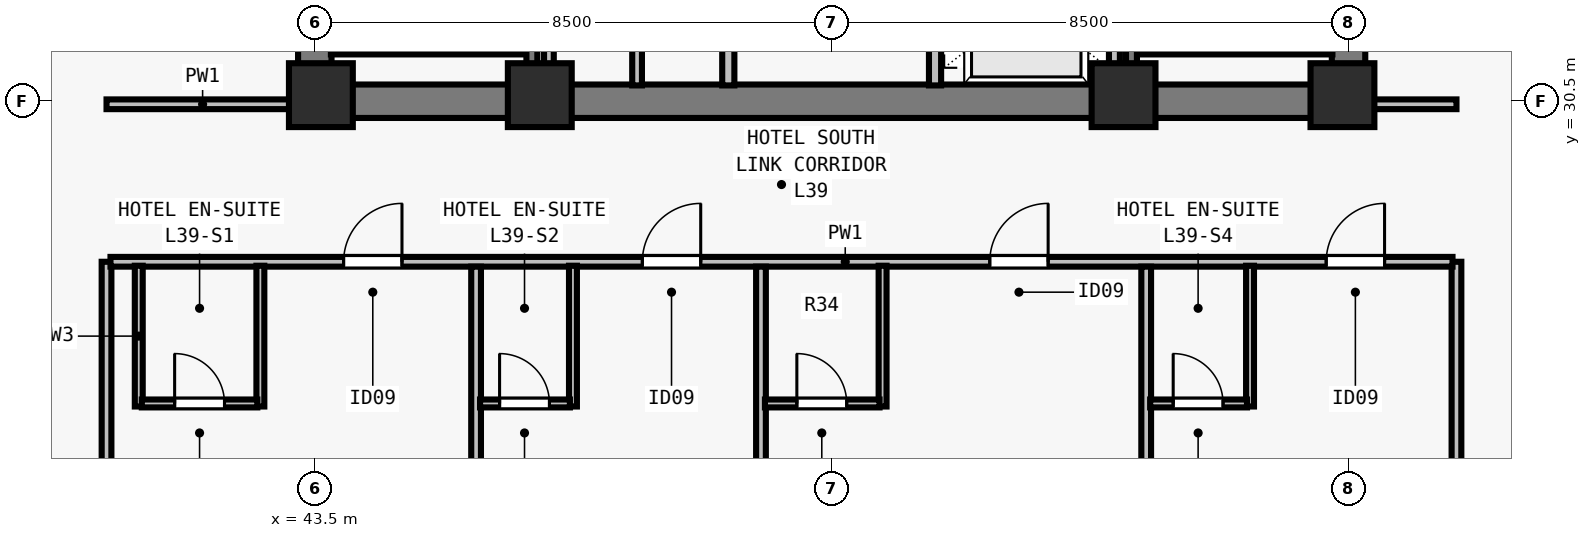
"""IFC4 building model, lengths in metres.
Left out: names, types, materials, properties, quantities, classifications, styles, units other than length and angle.
Written with IfcOpenShell. Run it as: python <this file> out.ifc"""

import sys

from ifc_helpers import new_model, si_unit, direction, frame, frame_2d, origin, origin_2d, place, context, subcontext, project, spatial, rectangle, extrude, element, fill, save


model = new_model("IFC4")
c1 = context("Model", 3, precision=1e-05, world=origin(), true_north=direction((0.0, 1.0)))
c2 = subcontext(c1, "Body", "Model", "MODEL_VIEW")
j1 = project(units=[si_unit("LENGTHUNIT", "METRE"), si_unit("PLANEANGLEUNIT", "RADIAN")], contexts=[c1])
p1 = place(None, origin())
s1 = spatial("IfcSite", under=j1, at=p1, CompositionType="ELEMENT")
p2 = place(p1, origin())
s2 = spatial("IfcBuilding", under=s1, at=p2, CompositionType="ELEMENT")
p3 = place(p2, frame((0.0, 0.0, 144.5)))
s3 = spatial("IfcBuildingStorey", under=s2, at=p3, CompositionType="ELEMENT", Elevation=144.5)
for number, where, z_axis, x_axis in (
    (1, (43.6, 30.6, 0.0), (0.0, 0.0, 1.0), (1.0, 0.0, 0.0)),
    (2, (47.2, 30.6, 0.0), (0.0, 0.0, 1.0), (1.0, 0.0, 0.0)),
    (3, (56.8, 30.6, 0.0), (0.0, 0.0, 1.0), (1.0, 0.0, 0.0)),
    (4, (60.4, 30.6, 0.0), (0.0, 0.0, 1.0), (1.0, 0.0, 0.0)),
):
    element("IfcColumn", number, at=place(p3, frame(where, z_axis=z_axis, x_axis=x_axis)), inside=s3, PredefinedType="COLUMN", context=c2, shape_type="SweptSolid", body=[
        extrude(rectangle(XDim=1.05, YDim=1.05, at=origin_2d()), origin(), (0.0, 0.0, 1.0), 3.5),
    ])
p4 = place(p3, frame((43.225, 30.5, 0.0), z_axis=(0.0, 0.0, 1.0), x_axis=(1.0, 0.0, 0.0)))
e5 = element("IfcWall", 5, at=p4, inside=s3, PredefinedType="SHEAR", context=c2, shape_type="SweptSolid", body=[
    extrude(rectangle(XDim=17.55, YDim=0.55, at=frame_2d((8.775, 0.0))), origin(), (0.0, 0.0, 1.0), 3.28),
])
for number, where, z_axis, x_axis in (
    (6, (43.5, 30.765, 0.0), (0.0, 0.0, 1.0), (0.0, 1.0, 0.0)),
    (7, (60.5, 30.765, 0.0), (0.0, 0.0, 1.0), (0.0, 1.0, 0.0)),
):
    element("IfcWall", number, at=place(p3, frame(where, z_axis=z_axis, x_axis=x_axis)), inside=s3, PredefinedType="SHEAR", context=c2, shape_type="SweptSolid", body=[
        extrude(rectangle(XDim=7.985, YDim=0.55, at=frame_2d((3.993, 0.0))), origin(), (0.0, 0.0, 1.0), 3.28),
    ])
p5 = place(p3, frame((50.3, 30.76, 0.0), z_axis=(0.0, 0.0, 1.0), x_axis=(0.0, 1.0, 0.0)))
e8 = element("IfcWall", 8, at=p5, inside=s3, PredefinedType="SOLIDWALL", context=c2, shape_type="SweptSolid", body=[
    extrude(rectangle(XDim=7.855, YDim=0.2, at=frame_2d((3.927, 0.0))), origin(), (0.0, 0.0, 1.0), 3.28),
])
p6 = place(p5, frame((2.09, 0.0, 0.0)))
e9 = element("IfcOpeningElement", 9, at=p6, cuts=e8, PredefinedType="OPENING", context=c2, shape_type="SweptSolid", body=[
    extrude(rectangle(XDim=0.95, YDim=2.12, at=frame_2d((0.475, 1.06))), frame((0.0, 0.11, 0.0), z_axis=(0.0, -1.0, 0.0), x_axis=(1.0, 0.0, 0.0)), (0.0, 0.0, 1.0), 0.22),
])
p7 = place(p3, frame((53.7, 30.76, 0.0), z_axis=(0.0, 0.0, 1.0), x_axis=(0.0, 1.0, 0.0)))
e10 = element("IfcWall", 10, at=p7, inside=s3, PredefinedType="SOLIDWALL", context=c2, shape_type="SweptSolid", body=[
    extrude(rectangle(XDim=7.855, YDim=0.2, at=frame_2d((3.927, 0.0))), origin(), (0.0, 0.0, 1.0), 3.28),
])
p8 = place(p7, frame((0.79, 0.0, 0.0)))
e11 = element("IfcOpeningElement", 11, at=p8, cuts=e10, PredefinedType="OPENING", context=c2, shape_type="SweptSolid", body=[
    extrude(rectangle(XDim=1.1, YDim=2.2, at=frame_2d((0.55, 1.1))), frame((0.0, 0.11, 0.0), z_axis=(0.0, -1.0, 0.0), x_axis=(1.0, 0.0, 0.0)), (0.0, 0.0, 1.0), 0.22),
])
p9 = place(p7, frame((3.49, 0.0, 0.0)))
e12 = element("IfcOpeningElement", 12, at=p9, cuts=e10, PredefinedType="OPENING", context=c2, shape_type="SweptSolid", body=[
    extrude(rectangle(XDim=1.1, YDim=2.2, at=frame_2d((0.55, 1.1))), frame((0.0, 0.11, 0.0), z_axis=(0.0, -1.0, 0.0), x_axis=(1.0, 0.0, 0.0)), (0.0, 0.0, 1.0), 0.22),
])
p10 = place(p7, frame((6.19, 0.0, 0.0)))
e13 = element("IfcOpeningElement", 13, at=p10, cuts=e10, PredefinedType="OPENING", context=c2, shape_type="SweptSolid", body=[
    extrude(rectangle(XDim=1.1, YDim=2.2, at=frame_2d((0.55, 1.1))), frame((0.0, 0.11, 0.0), z_axis=(0.0, -1.0, 0.0), x_axis=(1.0, 0.0, 0.0)), (0.0, 0.0, 1.0), 0.22),
])
p11 = place(p3, frame((47.35, 30.76, 0.0), z_axis=(0.0, 0.0, 1.0), x_axis=(0.0, 1.0, 0.0)))
e14 = element("IfcWall", 14, at=p11, inside=s3, PredefinedType="PARTITIONING", context=c2, shape_type="SweptSolid", body=[
    extrude(rectangle(XDim=7.855, YDim=0.16, at=frame_2d((3.927, 0.0))), origin(), (0.0, 0.0, 1.0), 3.28),
])
p12 = place(p3, frame((48.8, 30.76, 0.0), z_axis=(0.0, 0.0, 1.0), x_axis=(0.0, 1.0, 0.0)))
e15 = element("IfcWall", 15, at=p12, inside=s3, PredefinedType="PARTITIONING", context=c2, shape_type="SweptSolid", body=[
    extrude(rectangle(XDim=7.855, YDim=0.16, at=frame_2d((3.927, 0.0))), origin(), (0.0, 0.0, 1.0), 3.28),
])
p13 = place(p12, frame((3.49, 0.0, 0.0)))
e16 = element("IfcOpeningElement", 16, at=p13, cuts=e15, PredefinedType="OPENING", context=c2, shape_type="SweptSolid", body=[
    extrude(rectangle(XDim=0.85, YDim=2.12, at=frame_2d((0.425, 1.06))), frame((0.0, 0.09, 0.0), z_axis=(0.0, -1.0, 0.0), x_axis=(1.0, 0.0, 0.0)), (0.0, 0.0, 1.0), 0.18),
])
p14 = place(p3, frame((56.65, 30.76, 0.0), z_axis=(0.0, 0.0, 1.0), x_axis=(0.0, 1.0, 0.0)))
e17 = element("IfcWall", 17, at=p14, inside=s3, PredefinedType="SOLIDWALL", context=c2, shape_type="SweptSolid", body=[
    extrude(rectangle(XDim=7.855, YDim=0.18, at=frame_2d((3.927, 0.0))), origin(), (0.0, 0.0, 1.0), 3.28),
])
p15 = place(p3, frame((40.075, 17.262, 0.0), z_axis=(0.0, 0.0, 1.0), x_axis=(0.0, 1.0, 0.0)))
e18 = element("IfcWall", 18, at=p15, inside=s3, PredefinedType="PARTITIONING", context=c2, shape_type="SweptSolid", body=[
    extrude(rectangle(XDim=10.598, YDim=0.16, at=frame_2d((5.299, 0.0))), origin(), (0.0, 0.0, 1.0), 2.555),
])
p16 = place(p3, frame((40.075, 30.45, 0.0), z_axis=(0.0, 0.0, 1.0), x_axis=(1.0, 0.0, 0.0)))
e19 = element("IfcWall", 19, at=p16, inside=s3, PredefinedType="PARTITIONING", context=c2, shape_type="SweptSolid", body=[
    extrude(rectangle(XDim=3.16, YDim=0.16, at=frame_2d((1.58, 0.0))), origin(), (0.0, 0.0, 1.0), 3.28),
])
p17 = place(p3, frame((62.275, 15.325, 0.0), z_axis=(0.0, 0.0, 1.0), x_axis=(0.0, 1.0, 0.0)))
e20 = element("IfcWall", 20, at=p17, inside=s3, PredefinedType="PARTITIONING", context=c2, shape_type="SweptSolid", body=[
    extrude(rectangle(XDim=12.535, YDim=0.16, at=frame_2d((6.268, 0.0))), origin(), (0.0, 0.0, 1.0), 3.28),
])
p18 = place(p3, frame((60.765, 30.45, 0.0), z_axis=(0.0, 0.0, 1.0), x_axis=(1.0, 0.0, 0.0)))
e21 = element("IfcWall", 21, at=p18, inside=s3, PredefinedType="PARTITIONING", context=c2, shape_type="SweptSolid", body=[
    extrude(rectangle(XDim=1.51, YDim=0.16, at=frame_2d((0.755, 0.0))), origin(), (0.0, 0.0, 1.0), 3.28),
])
p19 = place(p3, frame((40.14, 27.86, 0.0), z_axis=(0.0, 0.0, 1.0), x_axis=(1.0, 0.0, 0.0)))
e22 = element("IfcWall", 22, at=p19, inside=s3, PredefinedType="PARTITIONING", context=c2, shape_type="SweptSolid", body=[
    extrude(rectangle(XDim=22.07, YDim=0.16, at=frame_2d((11.035, 0.0))), origin(), (0.0, 0.0, 1.0), 3.28),
])
p20 = place(p19, frame((3.834, 0.0, 0.0)))
e23 = element("IfcOpeningElement", 23, at=p20, cuts=e22, PredefinedType="OPENING", context=c2, shape_type="SweptSolid", body=[
    extrude(rectangle(XDim=0.96, YDim=2.15, at=frame_2d((0.48, 1.075))), frame((0.0, 0.09, 0.0), z_axis=(0.0, -1.0, 0.0), x_axis=(1.0, 0.0, 0.0)), (0.0, 0.0, 1.0), 0.18),
])
p21 = place(p19, frame((8.746, 0.0, 0.0)))
e24 = element("IfcOpeningElement", 24, at=p21, cuts=e22, PredefinedType="OPENING", context=c2, shape_type="SweptSolid", body=[
    extrude(rectangle(XDim=0.96, YDim=2.15, at=frame_2d((0.48, 1.075))), frame((0.0, 0.09, 0.0), z_axis=(0.0, -1.0, 0.0), x_axis=(1.0, 0.0, 0.0)), (0.0, 0.0, 1.0), 0.18),
])
p22 = place(p19, frame((14.46, 0.0, 0.0)))
e25 = element("IfcOpeningElement", 25, at=p22, cuts=e22, PredefinedType="OPENING", context=c2, shape_type="SweptSolid", body=[
    extrude(rectangle(XDim=0.96, YDim=2.15, at=frame_2d((0.48, 1.075))), frame((0.0, 0.09, 0.0), z_axis=(0.0, -1.0, 0.0), x_axis=(1.0, 0.0, 0.0)), (0.0, 0.0, 1.0), 0.18),
])
p23 = place(p19, frame((19.993, 0.0, 0.0)))
e26 = element("IfcOpeningElement", 26, at=p23, cuts=e22, PredefinedType="OPENING", context=c2, shape_type="SweptSolid", body=[
    extrude(rectangle(XDim=0.96, YDim=2.15, at=frame_2d((0.48, 1.075))), frame((0.0, 0.09, 0.0), z_axis=(0.0, -1.0, 0.0), x_axis=(1.0, 0.0, 0.0)), (0.0, 0.0, 1.0), 0.18),
])
p24 = place(p3, frame((40.605, 25.48, 0.0), z_axis=(0.0, 0.0, 1.0), x_axis=(0.0, 1.0, 0.0)))
e27 = element("IfcWall", 27, at=p24, inside=s3, PredefinedType="PLUMBINGWALL", context=c2, shape_type="SweptSolid", body=[
    extrude(rectangle(XDim=2.315, YDim=0.13, at=frame_2d((1.157, 0.0))), origin(), (0.0, 0.0, 1.0), 2.555),
])
p25 = place(p3, frame((42.605, 25.48, 0.0), z_axis=(0.0, 0.0, 1.0), x_axis=(0.0, 1.0, 0.0)))
e28 = element("IfcWall", 28, at=p25, inside=s3, PredefinedType="PLUMBINGWALL", context=c2, shape_type="SweptSolid", body=[
    extrude(rectangle(XDim=2.315, YDim=0.13, at=frame_2d((1.157, 0.0))), origin(), (0.0, 0.0, 1.0), 3.28),
])
p26 = place(p3, frame((40.655, 25.53, 0.0), z_axis=(0.0, 0.0, 1.0), x_axis=(1.0, 0.0, 0.0)))
e29 = element("IfcWall", 29, at=p26, inside=s3, PredefinedType="PLUMBINGWALL", context=c2, shape_type="SweptSolid", body=[
    extrude(rectangle(XDim=1.9, YDim=0.13, at=frame_2d((0.95, 0.0))), origin(), (0.0, 0.0, 1.0), 3.28),
])
p27 = place(p26, frame((0.54, 0.0, 0.0)))
e30 = element("IfcOpeningElement", 30, at=p27, cuts=e29, PredefinedType="OPENING", context=c2, shape_type="SweptSolid", body=[
    extrude(rectangle(XDim=0.82, YDim=2.1, at=frame_2d((0.41, 1.05))), frame((0.0, 0.075, 0.0), z_axis=(0.0, -1.0, 0.0), x_axis=(1.0, 0.0, 0.0)), (0.0, 0.0, 1.0), 0.15),
])
p28 = place(p3, frame((46.153, 17.58, 0.0), z_axis=(0.0, 0.0, 1.0), x_axis=(0.0, 1.0, 0.0)))
e31 = element("IfcWall", 31, at=p28, inside=s3, PredefinedType="PARTITIONING", context=c2, shape_type="SweptSolid", body=[
    extrude(rectangle(XDim=10.2, YDim=0.16, at=frame_2d((5.1, 0.0))), origin(), (0.0, 0.0, 1.0), 3.28),
])
p29 = place(p3, frame((47.745, 25.48, 0.0), z_axis=(0.0, 0.0, 1.0), x_axis=(0.0, 1.0, 0.0)))
e32 = element("IfcWall", 32, at=p29, inside=s3, PredefinedType="PLUMBINGWALL", context=c2, shape_type="SweptSolid", body=[
    extrude(rectangle(XDim=2.315, YDim=0.13, at=frame_2d((1.157, 0.0))), origin(), (0.0, 0.0, 1.0), 3.28),
])
p30 = place(p3, frame((46.218, 25.53, 0.0), z_axis=(0.0, 0.0, 1.0), x_axis=(1.0, 0.0, 0.0)))
e33 = element("IfcWall", 33, at=p30, inside=s3, PredefinedType="PLUMBINGWALL", context=c2, shape_type="SweptSolid", body=[
    extrude(rectangle(XDim=1.478, YDim=0.13, at=frame_2d((0.739, 0.0))), origin(), (0.0, 0.0, 1.0), 3.28),
])
p31 = place(p30, frame((0.321, 0.0, 0.0)))
e34 = element("IfcOpeningElement", 34, at=p31, cuts=e33, PredefinedType="OPENING", context=c2, shape_type="SweptSolid", body=[
    extrude(rectangle(XDim=0.82, YDim=2.1, at=frame_2d((0.41, 1.05))), frame((0.0, 0.075, 0.0), z_axis=(0.0, -1.0, 0.0), x_axis=(1.0, 0.0, 0.0)), (0.0, 0.0, 1.0), 0.15),
])
p32 = place(p3, frame((50.837, 15.325, 0.0), z_axis=(0.0, 0.0, 1.0), x_axis=(0.0, 1.0, 0.0)))
e35 = element("IfcWall", 35, at=p32, inside=s3, PredefinedType="PARTITIONING", context=c2, shape_type="SweptSolid", body=[
    extrude(rectangle(XDim=12.455, YDim=0.16, at=frame_2d((6.228, 0.0))), origin(), (0.0, 0.0, 1.0), 2.896),
])
p33 = place(p3, frame((52.837, 25.48, 0.0), z_axis=(0.0, 0.0, 1.0), x_axis=(0.0, 1.0, 0.0)))
e36 = element("IfcWall", 36, at=p33, inside=s3, PredefinedType="PLUMBINGWALL", context=c2, shape_type="SweptSolid", body=[
    extrude(rectangle(XDim=2.315, YDim=0.13, at=frame_2d((1.157, 0.0))), origin(), (0.0, 0.0, 1.0), 3.28),
])
p34 = place(p3, frame((50.903, 25.53, 0.0), z_axis=(0.0, 0.0, 1.0), x_axis=(1.0, 0.0, 0.0)))
e37 = element("IfcWall", 37, at=p34, inside=s3, PredefinedType="PLUMBINGWALL", context=c2, shape_type="SweptSolid", body=[
    extrude(rectangle(XDim=1.885, YDim=0.13, at=frame_2d((0.942, 0.0))), origin(), (0.0, 0.0, 1.0), 3.28),
])
p35 = place(p34, frame((0.525, 0.0, 0.0)))
e38 = element("IfcOpeningElement", 38, at=p35, cuts=e37, PredefinedType="OPENING", context=c2, shape_type="SweptSolid", body=[
    extrude(rectangle(XDim=0.82, YDim=2.1, at=frame_2d((0.41, 1.05))), frame((0.0, 0.075, 0.0), z_axis=(0.0, -1.0, 0.0), x_axis=(1.0, 0.0, 0.0)), (0.0, 0.0, 1.0), 0.15),
])
p36 = place(p3, frame((57.173, 15.325, 0.0), z_axis=(0.0, 0.0, 1.0), x_axis=(0.0, 1.0, 0.0)))
e39 = element("IfcWall", 39, at=p36, inside=s3, PredefinedType="PARTITIONING", context=c2, shape_type="SweptSolid", body=[
    extrude(rectangle(XDim=12.455, YDim=0.16, at=frame_2d((6.228, 0.0))), origin(), (0.0, 0.0, 1.0), 3.28),
])
p37 = place(p3, frame((58.88, 25.48, 0.0), z_axis=(0.0, 0.0, 1.0), x_axis=(0.0, 1.0, 0.0)))
e40 = element("IfcWall", 40, at=p37, inside=s3, PredefinedType="PLUMBINGWALL", context=c2, shape_type="SweptSolid", body=[
    extrude(rectangle(XDim=2.315, YDim=0.13, at=frame_2d((1.157, 0.0))), origin(), (0.0, 0.0, 1.0), 3.28),
])
p38 = place(p3, frame((57.238, 25.53, 0.0), z_axis=(0.0, 0.0, 1.0), x_axis=(1.0, 0.0, 0.0)))
e41 = element("IfcWall", 41, at=p38, inside=s3, PredefinedType="PLUMBINGWALL", context=c2, shape_type="SweptSolid", body=[
    extrude(rectangle(XDim=1.593, YDim=0.13, at=frame_2d((0.796, 0.0))), origin(), (0.0, 0.0, 1.0), 3.28),
])
p39 = place(p38, frame((0.379, 0.0, 0.0)))
e42 = element("IfcOpeningElement", 42, at=p39, cuts=e41, PredefinedType="OPENING", context=c2, shape_type="SweptSolid", body=[
    extrude(rectangle(XDim=0.82, YDim=2.1, at=frame_2d((0.41, 1.05))), frame((0.0, 0.075, 0.0), z_axis=(0.0, -1.0, 0.0), x_axis=(1.0, 0.0, 0.0)), (0.0, 0.0, 1.0), 0.15),
])
p40 = place(p3, frame((43.765, 31.36, 0.0), z_axis=(0.0, 0.0, 1.0), x_axis=(1.0, 0.0, 0.0)))
e43 = element("IfcWall", 43, at=p40, inside=s3, PredefinedType="SOLIDWALL", context=c2, shape_type="SweptSolid", body=[
    extrude(rectangle(XDim=3.23, YDim=0.18, at=frame_2d((1.615, 0.0))), origin(), (0.0, 0.0, 1.0), 3.28),
])
p41 = place(p3, frame((47.07, 38.78, 0.0), z_axis=(0.0, 0.0, 1.0), x_axis=(0.0, -1.0, 0.0)))
e44 = element("IfcWall", 44, at=p41, inside=s3, PredefinedType="SOLIDWALL", context=c2, shape_type="SweptSolid", body=[
    extrude(rectangle(XDim=8.017, YDim=0.18, at=frame_2d((4.009, 0.0))), origin(), (0.0, 0.0, 1.0), 3.28),
])
p42 = place(p3, frame((57.005, 31.36, 0.0), z_axis=(0.0, 0.0, 1.0), x_axis=(1.0, 0.0, 0.0)))
e45 = element("IfcWall", 45, at=p42, inside=s3, PredefinedType="SOLIDWALL", context=c2, shape_type="SweptSolid", body=[
    extrude(rectangle(XDim=3.23, YDim=0.18, at=frame_2d((1.615, 0.0))), origin(), (0.0, 0.0, 1.0), 3.28),
])
p43 = place(p3, frame((56.93, 38.78, 0.0), z_axis=(0.0, 0.0, 1.0), x_axis=(0.0, -1.0, 0.0)))
e46 = element("IfcWall", 46, at=p43, inside=s3, PredefinedType="SOLIDWALL", context=c2, shape_type="SweptSolid", body=[
    extrude(rectangle(XDim=8.017, YDim=0.18, at=frame_2d((4.009, 0.0))), origin(), (0.0, 0.0, 1.0), 3.28),
])
p44 = place(p27, origin())
e47 = element("IfcDoor", 47, at=p44, inside=s3, OperationType="SINGLE_SWING_LEFT", PredefinedType="DOOR", context=c2, shape_type="SweptSolid", body=[
    extrude(rectangle(XDim=0.82, YDim=2.1, at=frame_2d((0.41, 1.05))), frame((0.0, 0.025, 0.0), z_axis=(0.0, -1.0, 0.0), x_axis=(1.0, 0.0, 0.0)), (0.0, 0.0, 1.0), 0.05),
])
fill(e30, e47)
p45 = place(p20, origin())
e48 = element("IfcDoor", 48, at=p45, inside=s3, OperationType="SINGLE_SWING_RIGHT", PredefinedType="DOOR", context=c2, shape_type="SweptSolid", body=[
    extrude(rectangle(XDim=0.96, YDim=2.15, at=frame_2d((0.48, 1.075))), frame((0.0, 0.025, 0.0), z_axis=(0.0, -1.0, 0.0), x_axis=(1.0, 0.0, 0.0)), (0.0, 0.0, 1.0), 0.05),
])
fill(e23, e48)
p46 = place(p31, origin())
e49 = element("IfcDoor", 49, at=p46, inside=s3, OperationType="SINGLE_SWING_LEFT", PredefinedType="DOOR", context=c2, shape_type="SweptSolid", body=[
    extrude(rectangle(XDim=0.82, YDim=2.1, at=frame_2d((0.41, 1.05))), frame((0.0, 0.025, 0.0), z_axis=(0.0, -1.0, 0.0), x_axis=(1.0, 0.0, 0.0)), (0.0, 0.0, 1.0), 0.05),
])
fill(e34, e49)
p47 = place(p21, origin())
e50 = element("IfcDoor", 50, at=p47, inside=s3, OperationType="SINGLE_SWING_RIGHT", PredefinedType="DOOR", context=c2, shape_type="SweptSolid", body=[
    extrude(rectangle(XDim=0.96, YDim=2.15, at=frame_2d((0.48, 1.075))), frame((0.0, 0.025, 0.0), z_axis=(0.0, -1.0, 0.0), x_axis=(1.0, 0.0, 0.0)), (0.0, 0.0, 1.0), 0.05),
])
fill(e24, e50)
p48 = place(p35, origin())
e51 = element("IfcDoor", 51, at=p48, inside=s3, OperationType="SINGLE_SWING_LEFT", PredefinedType="DOOR", context=c2, shape_type="SweptSolid", body=[
    extrude(rectangle(XDim=0.82, YDim=2.1, at=frame_2d((0.41, 1.05))), frame((0.0, 0.025, 0.0), z_axis=(0.0, -1.0, 0.0), x_axis=(1.0, 0.0, 0.0)), (0.0, 0.0, 1.0), 0.05),
])
fill(e38, e51)
p49 = place(p22, origin())
e52 = element("IfcDoor", 52, at=p49, inside=s3, OperationType="SINGLE_SWING_RIGHT", PredefinedType="DOOR", context=c2, shape_type="SweptSolid", body=[
    extrude(rectangle(XDim=0.96, YDim=2.15, at=frame_2d((0.48, 1.075))), frame((0.0, 0.025, 0.0), z_axis=(0.0, -1.0, 0.0), x_axis=(1.0, 0.0, 0.0)), (0.0, 0.0, 1.0), 0.05),
])
fill(e25, e52)
p50 = place(p39, origin())
e53 = element("IfcDoor", 53, at=p50, inside=s3, OperationType="SINGLE_SWING_LEFT", PredefinedType="DOOR", context=c2, shape_type="SweptSolid", body=[
    extrude(rectangle(XDim=0.82, YDim=2.1, at=frame_2d((0.41, 1.05))), frame((0.0, 0.025, 0.0), z_axis=(0.0, -1.0, 0.0), x_axis=(1.0, 0.0, 0.0)), (0.0, 0.0, 1.0), 0.05),
])
fill(e42, e53)
p51 = place(p23, origin())
e54 = element("IfcDoor", 54, at=p51, inside=s3, OperationType="SINGLE_SWING_RIGHT", PredefinedType="DOOR", context=c2, shape_type="SweptSolid", body=[
    extrude(rectangle(XDim=0.96, YDim=2.15, at=frame_2d((0.48, 1.075))), frame((0.0, 0.025, 0.0), z_axis=(0.0, -1.0, 0.0), x_axis=(1.0, 0.0, 0.0)), (0.0, 0.0, 1.0), 0.05),
])
fill(e26, e54)
save(model, sys.argv[1])
